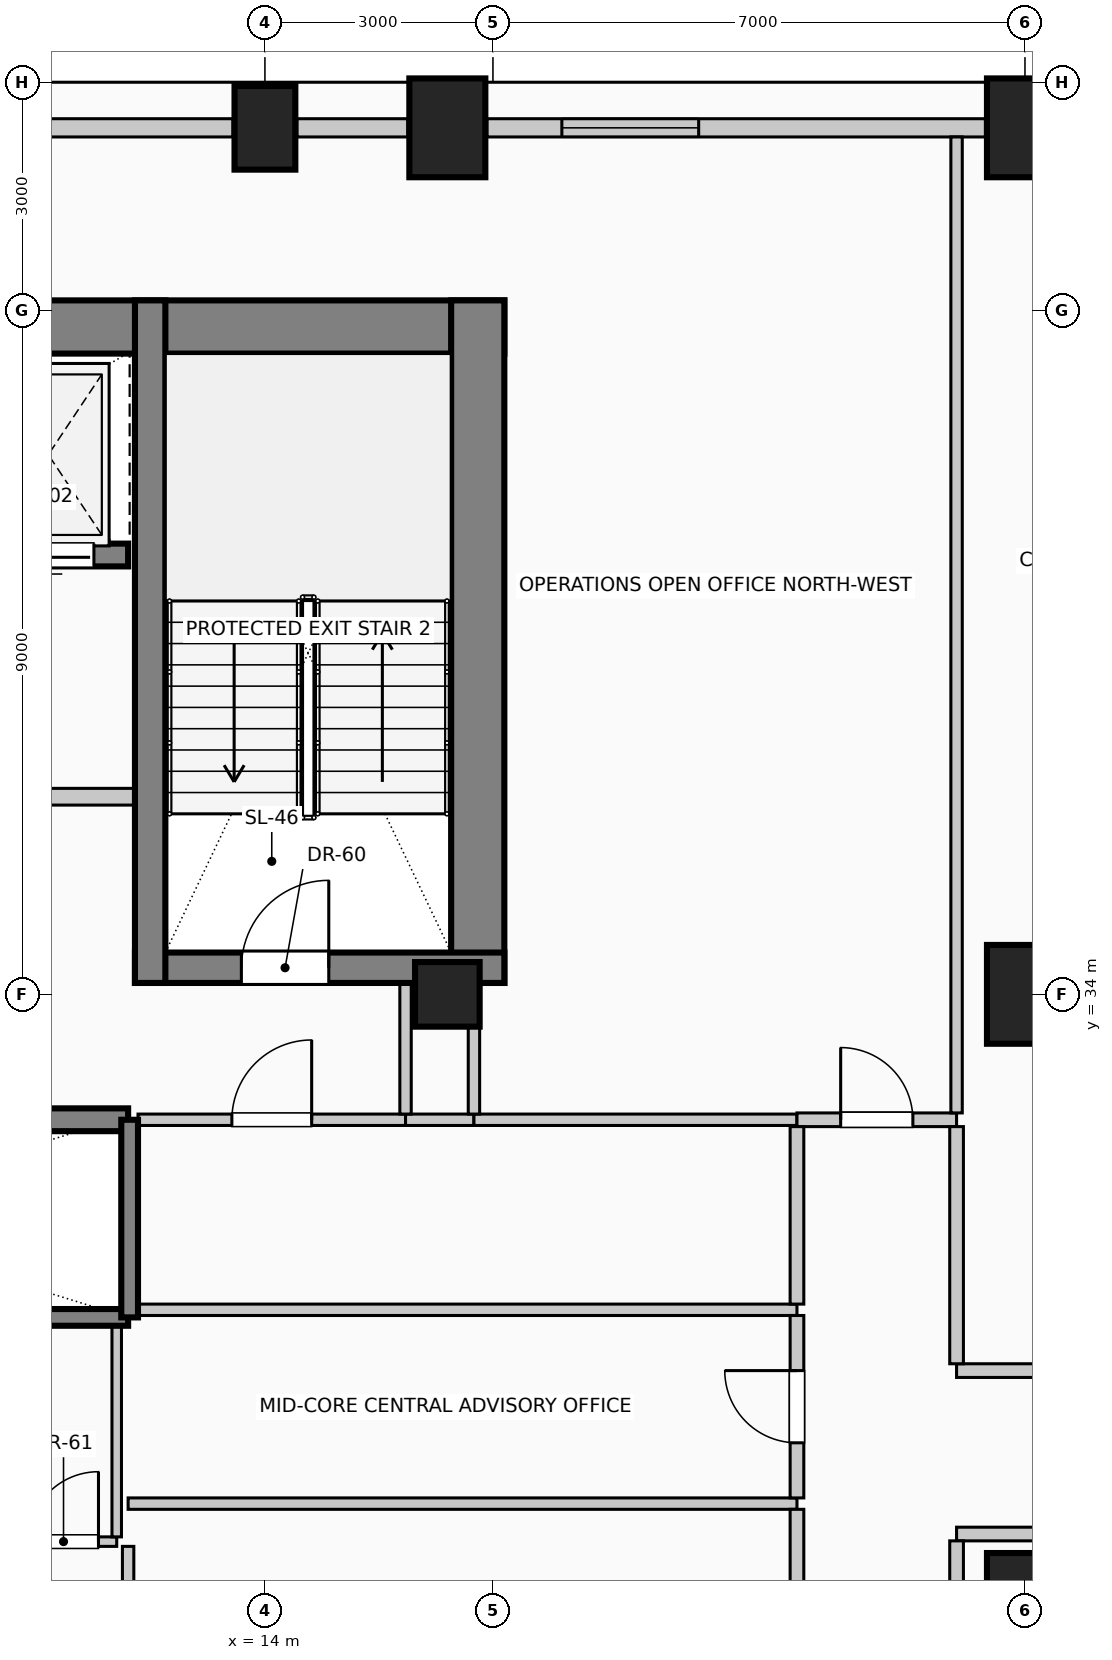
"""IFC4 building model, lengths in metres.
Left out: names, types, materials, properties, quantities, classifications, styles, units other than length and angle.
Written with IfcOpenShell. Run it as: python <this file> out.ifc"""

import sys

from ifc_helpers import new_model, si_unit, direction, frame, frame_2d, origin, origin_2d, place, context, subcontext, project, spatial, rectangle, circle, extrude, element, fill, save


model = new_model("IFC4")
c1 = context("Model", 3, precision=1e-05, world=origin(), true_north=direction((0.0, 1.0)))
c2 = subcontext(c1, "Body", "Model", "MODEL_VIEW")
j1 = project(units=[si_unit("LENGTHUNIT", "METRE"), si_unit("PLANEANGLEUNIT", "RADIAN")], contexts=[c1])
p1 = place(None, origin())
s1 = spatial("IfcSite", under=j1, at=p1, CompositionType="ELEMENT")
p2 = place(p1, origin())
s2 = spatial("IfcBuilding", under=s1, at=p2, CompositionType="ELEMENT")
p3 = place(p2, frame((0.0, 0.0, 214.6)))
s3 = spatial("IfcBuildingStorey", under=s2, at=p3, CompositionType="ELEMENT", Elevation=214.6)
p4 = place(p3, frame((2.85, 42.78, 0.0), z_axis=(0.0, 0.0, 1.0), x_axis=(1.0, 0.0, 0.0)))
e1 = element("IfcWall", 1, at=p4, inside=s3, PredefinedType="SHEAR", context=c2, shape_type="SweptSolid", body=[
    extrude(rectangle(XDim=14.3, YDim=0.7, at=frame_2d((7.15, 0.0))), origin(), (0.0, 0.0, 1.0), 4.0),
])
p5 = place(p3, frame((16.8, 34.15, 0.0), z_axis=(0.0, 0.0, 1.0), x_axis=(0.0, 1.0, 0.0)))
e2 = element("IfcWall", 2, at=p5, inside=s3, PredefinedType="SHEAR", context=c2, shape_type="SweptSolid", body=[
    extrude(rectangle(XDim=8.98, YDim=0.7, at=frame_2d((4.49, 0.0))), origin(), (0.0, 0.0, 1.0), 4.0),
])
p6 = place(p3, frame((12.29, 34.35, 0.0), z_axis=(0.0, 0.0, 1.0), x_axis=(1.0, 0.0, 0.0)))
e3 = element("IfcWall", 3, at=p6, inside=s3, PredefinedType="SHEAR", context=c2, shape_type="SweptSolid", body=[
    extrude(rectangle(XDim=4.86, YDim=0.4, at=frame_2d((2.43, 0.0))), origin(), (0.0, 0.0, 1.0), 4.0),
])
p7 = place(p6, frame((1.4, 0.0, 0.0)))
e4 = element("IfcOpeningElement", 4, at=p7, cuts=e3, PredefinedType="OPENING", context=c2, shape_type="SweptSolid", body=[
    extrude(rectangle(XDim=1.15, YDim=2.2, at=frame_2d((0.575, 1.1))), frame((0.0, 0.21, 0.0), z_axis=(0.0, -1.0, 0.0), x_axis=(1.0, 0.0, 0.0)), (0.0, 0.0, 1.0), 0.42),
])
p8 = place(p3, frame((12.49, 34.15, 0.0), z_axis=(0.0, 0.0, 1.0), x_axis=(0.0, 1.0, 0.0)))
e5 = element("IfcWall", 5, at=p8, inside=s3, PredefinedType="SHEAR", context=c2, shape_type="SweptSolid", body=[
    extrude(rectangle(XDim=8.98, YDim=0.4, at=frame_2d((4.49, 0.0))), origin(), (0.0, 0.0, 1.0), 4.0),
])
p9 = place(p3, frame((14.0, 45.4, 0.0), z_axis=(0.0, 0.0, 1.0), x_axis=(1.0, 0.0, 0.0)))
e6 = element("IfcColumn", 6, at=p9, inside=s3, PredefinedType="COLUMN", context=c2, shape_type="SweptSolid", body=[
    extrude(rectangle(XDim=0.8, YDim=1.1, at=origin_2d()), origin(), (0.0, 0.0, 1.0), 4.0),
])
for number, where, z_axis, x_axis in (
    (7, (16.4, 45.4, 0.0), (0.0, 0.0, 1.0), (1.0, 0.0, 0.0)),
    (8, (24.0, 45.4, 0.0), (0.0, 0.0, 1.0), (1.0, 0.0, 0.0)),
    (9, (24.0, 26.0, 0.0), (0.0, 0.0, 1.0), (1.0, 0.0, 0.0)),
    (10, (24.0, 34.0, 0.0), (0.0, 0.0, 1.0), (1.0, 0.0, 0.0)),
):
    element("IfcColumn", number, at=place(p3, frame(where, z_axis=z_axis, x_axis=x_axis)), inside=s3, PredefinedType="COLUMN", context=c2, shape_type="SweptSolid", body=[
        extrude(rectangle(XDim=1.0, YDim=1.3, at=origin_2d()), origin(), (0.0, 0.0, 1.0), 4.0),
    ])
p10 = place(p3, frame((16.4, 34.0, 0.0), z_axis=(0.0, 0.0, 1.0), x_axis=(1.0, 0.0, 0.0)))
e11 = element("IfcColumn", 11, at=p10, inside=s3, PredefinedType="COLUMN", context=c2, shape_type="SweptSolid", body=[
    extrude(circle(Radius=0.425, at=origin_2d()), origin(), (0.0, 0.0, 1.0), 4.0),
])
p11 = place(p3, frame((8.92, 45.4, 0.0), z_axis=(0.0, 0.0, 1.0), x_axis=(1.0, 0.0, 0.0)))
e12 = element("IfcWall", 12, at=p11, inside=s3, PredefinedType="SOLIDWALL", context=c2, shape_type="SweptSolid", body=[
    extrude(rectangle(XDim=4.66, YDim=0.24, at=frame_2d((2.33, 0.0))), origin(), (0.0, 0.0, 1.0), 3.0),
])
p12 = place(p3, frame((14.42, 45.4, 0.0), z_axis=(0.0, 0.0, 1.0), x_axis=(1.0, 0.0, 0.0)))
e13 = element("IfcWall", 13, at=p12, inside=s3, PredefinedType="SOLIDWALL", context=c2, shape_type="SweptSolid", body=[
    extrude(rectangle(XDim=1.46, YDim=0.24, at=frame_2d((0.73, 0.0))), origin(), (0.0, 0.0, 1.0), 3.0),
])
p13 = place(p3, frame((16.92, 45.4, 0.0), z_axis=(0.0, 0.0, 1.0), x_axis=(1.0, 0.0, 0.0)))
e14 = element("IfcWall", 14, at=p13, inside=s3, PredefinedType="SOLIDWALL", context=c2, shape_type="SweptSolid", body=[
    extrude(rectangle(XDim=6.56, YDim=0.24, at=frame_2d((3.28, 0.0))), origin(), (0.0, 0.0, 1.0), 3.0),
])
p14 = place(p13, frame((0.987, 0.0, 0.42)))
e15 = element("IfcOpeningElement", 15, at=p14, cuts=e14, PredefinedType="OPENING", context=c2, shape_type="SweptSolid", body=[
    extrude(rectangle(XDim=1.8, YDim=2.2, at=frame_2d((0.9, 1.1))), frame((0.0, 0.13, 0.0), z_axis=(0.0, -1.0, 0.0), x_axis=(1.0, 0.0, 0.0)), (0.0, 0.0, 1.0), 0.26),
])
p15 = place(p3, frame((10.05, 32.35, 0.0), z_axis=(0.0, 0.0, 1.0), x_axis=(1.0, 0.0, 0.0)))
e16 = element("IfcWall", 16, at=p15, inside=s3, PredefinedType="SOLIDWALL", context=c2, shape_type="SweptSolid", body=[
    extrude(rectangle(XDim=2.15, YDim=0.3, at=frame_2d((1.075, 0.0))), origin(), (0.0, 0.0, 1.0), 4.0),
])
p16 = place(p3, frame((12.2, 39.78, 0.0), z_axis=(0.0, 0.0, 1.0), x_axis=(-1.0, 0.0, 0.0)))
e17 = element("IfcWall", 17, at=p16, inside=s3, PredefinedType="SOLIDWALL", context=c2, shape_type="SweptSolid", body=[
    extrude(rectangle(XDim=2.2, YDim=0.3, at=frame_2d((1.1, 0.0))), origin(), (0.0, 0.0, 1.0), 4.0),
])
p17 = place(p16, frame((0.45, 0.0, 0.0)))
e18 = element("IfcOpeningElement", 18, at=p17, cuts=e17, PredefinedType="OPENING", context=c2, shape_type="SweptSolid", body=[
    extrude(rectangle(XDim=1.3, YDim=2.25, at=frame_2d((0.65, 1.125))), frame((0.0, 0.16, 0.0), z_axis=(0.0, -1.0, 0.0), x_axis=(1.0, 0.0, 0.0)), (0.0, 0.0, 1.0), 0.32),
])
p18 = place(p3, frame((3.55, 29.75, 0.0), z_axis=(0.0, 0.0, 1.0), x_axis=(1.0, 0.0, 0.0)))
e19 = element("IfcWall", 19, at=p18, inside=s3, PredefinedType="SOLIDWALL", context=c2, shape_type="SweptSolid", body=[
    extrude(rectangle(XDim=8.65, YDim=0.22, at=frame_2d((4.325, 0.0))), origin(), (0.0, 0.0, 1.0), 4.0),
])
p19 = place(p3, frame((12.22, 29.75, 0.0), z_axis=(0.0, 0.0, 1.0), x_axis=(0.0, 1.0, 0.0)))
e20 = element("IfcWall", 20, at=p19, inside=s3, PredefinedType="SOLIDWALL", context=c2, shape_type="SweptSolid", body=[
    extrude(rectangle(XDim=2.6, YDim=0.22, at=frame_2d((1.3, 0.0))), origin(), (0.0, 0.0, 1.0), 4.0),
])
p20 = place(p3, frame((7.51, 36.6, 0.0), z_axis=(0.0, 0.0, 1.0), x_axis=(1.0, 0.0, 0.0)))
e21 = element("IfcWall", 21, at=p20, inside=s3, PredefinedType="PARTITIONING", context=c2, shape_type="SweptSolid", body=[
    extrude(rectangle(XDim=4.98, YDim=0.22, at=frame_2d((2.49, 0.0))), origin(), (0.0, 0.0, 1.0), 3.75),
])
p21 = place(p20, frame((1.94, 0.0, 0.0)))
e22 = element("IfcOpeningElement", 22, at=p21, cuts=e21, PredefinedType="OPENING", context=c2, shape_type="SweptSolid", body=[
    extrude(rectangle(XDim=1.1, YDim=2.2, at=frame_2d((0.55, 1.1))), frame((0.0, 0.12, 0.0), z_axis=(0.0, -1.0, 0.0), x_axis=(1.0, 0.0, 0.0)), (0.0, 0.0, 1.0), 0.24),
])
p22 = place(p3, frame((10.65, 26.8, 0.0), z_axis=(0.0, 0.0, 1.0), x_axis=(1.0, 0.0, 0.0)))
e23 = element("IfcWall", 23, at=p22, inside=s3, PredefinedType="PARTITIONING", context=c2, shape_type="SweptSolid", body=[
    extrude(rectangle(XDim=1.4, YDim=0.125, at=frame_2d((0.7, 0.0))), origin(), (0.0, 0.0, 1.0), 3.75),
])
p23 = place(p22, frame((0.24, 0.0, 0.0)))
e24 = element("IfcOpeningElement", 24, at=p23, cuts=e23, PredefinedType="OPENING", context=c2, shape_type="SweptSolid", body=[
    extrude(rectangle(XDim=0.92, YDim=2.1, at=frame_2d((0.46, 1.05))), frame((0.0, 0.073, 0.0), z_axis=(0.0, -1.0, 0.0), x_axis=(1.0, 0.0, 0.0)), (0.0, 0.0, 1.0), 0.145),
])
p24 = place(p3, frame((23.1, 26.9, 0.0), z_axis=(0.0, 0.0, 1.0), x_axis=(1.0, 0.0, 0.0)))
e25 = element("IfcWall", 25, at=p24, inside=s3, PredefinedType="PARTITIONING", context=c2, shape_type="SweptSolid", body=[
    extrude(rectangle(XDim=11.65, YDim=0.18, at=frame_2d((5.825, 0.0))), origin(), (0.0, 0.0, 1.0), 3.75),
])
p25 = place(p24, frame((5.3, 0.0, 0.0)))
e26 = element("IfcOpeningElement", 26, at=p25, cuts=e25, PredefinedType="OPENING", context=c2, shape_type="SweptSolid", body=[
    extrude(rectangle(XDim=1.05, YDim=2.15, at=frame_2d((0.525, 1.075))), frame((0.0, 0.1, 0.0), z_axis=(0.0, -1.0, 0.0), x_axis=(1.0, 0.0, 0.0)), (0.0, 0.0, 1.0), 0.2),
])
p26 = place(p3, frame((12.2, 27.3, 0.0), z_axis=(0.0, 0.0, 1.0), x_axis=(1.0, 0.0, 0.0)))
e27 = element("IfcWall", 27, at=p26, inside=s3, PredefinedType="PARTITIONING", context=c2, shape_type="SweptSolid", body=[
    extrude(rectangle(XDim=8.8, YDim=0.15, at=frame_2d((4.4, 0.0))), origin(), (0.0, 0.0, 1.0), 3.75),
])
p27 = place(p3, frame((23.1, 29.05, 0.0), z_axis=(0.0, 0.0, 1.0), x_axis=(1.0, 0.0, 0.0)))
e28 = element("IfcWall", 28, at=p27, inside=s3, PredefinedType="PARTITIONING", context=c2, shape_type="SweptSolid", body=[
    extrude(rectangle(XDim=4.99, YDim=0.18, at=frame_2d((2.495, 0.0))), origin(), (0.0, 0.0, 1.0), 3.75),
])
p28 = place(p27, frame((2.02, 0.0, 0.0)))
e29 = element("IfcOpeningElement", 29, at=p28, cuts=e28, PredefinedType="OPENING", context=c2, shape_type="SweptSolid", body=[
    extrude(rectangle(XDim=0.95, YDim=2.15, at=frame_2d((0.475, 1.075))), frame((0.0, 0.1, 0.0), z_axis=(0.0, -1.0, 0.0), x_axis=(1.0, 0.0, 0.0)), (0.0, 0.0, 1.0), 0.2),
])
p29 = place(p3, frame((12.33, 29.85, 0.0), z_axis=(0.0, 0.0, 1.0), x_axis=(1.0, 0.0, 0.0)))
e30 = element("IfcWall", 30, at=p29, inside=s3, PredefinedType="PARTITIONING", context=c2, shape_type="SweptSolid", body=[
    extrude(rectangle(XDim=8.67, YDim=0.15, at=frame_2d((4.335, 0.0))), origin(), (0.0, 0.0, 1.0), 3.75),
])
p30 = place(p3, frame((12.33, 32.35, 0.0), z_axis=(0.0, 0.0, 1.0), x_axis=(1.0, 0.0, 0.0)))
e31 = element("IfcWall", 31, at=p30, inside=s3, PredefinedType="PARTITIONING", context=c2, shape_type="SweptSolid", body=[
    extrude(rectangle(XDim=3.52, YDim=0.15, at=frame_2d((1.76, 0.0))), origin(), (0.0, 0.0, 1.0), 3.75),
])
p31 = place(p30, frame((1.235, 0.0, 0.0)))
e32 = element("IfcOpeningElement", 32, at=p31, cuts=e31, PredefinedType="OPENING", context=c2, shape_type="SweptSolid", body=[
    extrude(rectangle(XDim=1.05, YDim=2.15, at=frame_2d((0.525, 1.075))), frame((0.0, 0.085, 0.0), z_axis=(0.0, -1.0, 0.0), x_axis=(1.0, 0.0, 0.0)), (0.0, 0.0, 1.0), 0.17),
])
p32 = place(p3, frame((15.85, 32.35, 0.0), z_axis=(0.0, 0.0, 1.0), x_axis=(1.0, 0.0, 0.0)))
e33 = element("IfcWall", 33, at=p32, inside=s3, PredefinedType="PARTITIONING", context=c2, shape_type="SweptSolid", body=[
    extrude(rectangle(XDim=0.9, YDim=0.15, at=frame_2d((0.45, 0.0))), origin(), (0.0, 0.0, 1.0), 3.75),
])
p33 = place(p3, frame((16.75, 32.35, 0.0), z_axis=(0.0, 0.0, 1.0), x_axis=(1.0, 0.0, 0.0)))
e34 = element("IfcWall", 34, at=p33, inside=s3, PredefinedType="PARTITIONING", context=c2, shape_type="SweptSolid", body=[
    extrude(rectangle(XDim=4.25, YDim=0.15, at=frame_2d((2.125, 0.0))), origin(), (0.0, 0.0, 1.0), 3.75),
])
p34 = place(p3, frame((21.0, 32.35, 0.0), z_axis=(0.0, 0.0, 1.0), x_axis=(1.0, 0.0, 0.0)))
e35 = element("IfcWall", 35, at=p34, inside=s3, PredefinedType="PARTITIONING", context=c2, shape_type="SweptSolid", body=[
    extrude(rectangle(XDim=2.1, YDim=0.18, at=frame_2d((1.05, 0.0))), origin(), (0.0, 0.0, 1.0), 3.75),
])
p35 = place(p34, frame((0.575, 0.0, 0.0)))
e36 = element("IfcOpeningElement", 36, at=p35, cuts=e35, PredefinedType="OPENING", context=c2, shape_type="SweptSolid", body=[
    extrude(rectangle(XDim=0.95, YDim=2.15, at=frame_2d((0.475, 1.075))), frame((0.0, 0.1, 0.0), z_axis=(0.0, -1.0, 0.0), x_axis=(1.0, 0.0, 0.0)), (0.0, 0.0, 1.0), 0.2),
])
p36 = place(p3, frame((12.05, 26.863, 0.0), z_axis=(0.0, 0.0, 1.0), x_axis=(0.0, 1.0, 0.0)))
e37 = element("IfcWall", 37, at=p36, inside=s3, PredefinedType="PARTITIONING", context=c2, shape_type="SweptSolid", body=[
    extrude(rectangle(XDim=2.777, YDim=0.125, at=frame_2d((1.389, 0.0))), origin(), (0.0, 0.0, 1.0), 3.75),
])
p37 = place(p3, frame((12.2, 24.863, 0.0), z_axis=(0.0, 0.0, 1.0), x_axis=(0.0, 1.0, 0.0)))
e38 = element("IfcWall", 38, at=p37, inside=s3, PredefinedType="PARTITIONING", context=c2, shape_type="SweptSolid", body=[
    extrude(rectangle(XDim=1.875, YDim=0.15, at=frame_2d((0.938, 0.0))), origin(), (0.0, 0.0, 1.0), 3.75),
])
p38 = place(p37, frame((0.462, 0.0, 0.0)))
e39 = element("IfcOpeningElement", 39, at=p38, cuts=e38, PredefinedType="OPENING", context=c2, shape_type="SweptSolid", body=[
    extrude(rectangle(XDim=0.95, YDim=2.15, at=frame_2d((0.475, 1.075))), frame((0.0, 0.085, 0.0), z_axis=(0.0, -1.0, 0.0), x_axis=(1.0, 0.0, 0.0)), (0.0, 0.0, 1.0), 0.17),
])
p39 = place(p3, frame((15.85, 32.425, 0.0), z_axis=(0.0, 0.0, 1.0), x_axis=(0.0, 1.0, 0.0)))
e40 = element("IfcWall", 40, at=p39, inside=s3, PredefinedType="PARTITIONING", context=c2, shape_type="SweptSolid", body=[
    extrude(rectangle(XDim=1.725, YDim=0.15, at=frame_2d((0.862, 0.0))), origin(), (0.0, 0.0, 1.0), 3.75),
])
p40 = place(p3, frame((16.75, 32.425, 0.0), z_axis=(0.0, 0.0, 1.0), x_axis=(0.0, 1.0, 0.0)))
e41 = element("IfcWall", 41, at=p40, inside=s3, PredefinedType="PARTITIONING", context=c2, shape_type="SweptSolid", body=[
    extrude(rectangle(XDim=1.15, YDim=0.15, at=frame_2d((0.575, 0.0))), origin(), (0.0, 0.0, 1.0), 3.75),
])
p41 = place(p3, frame((21.0, 24.875, 0.0), z_axis=(0.0, 0.0, 1.0), x_axis=(0.0, 1.0, 0.0)))
e42 = element("IfcWall", 42, at=p41, inside=s3, PredefinedType="PARTITIONING", context=c2, shape_type="SweptSolid", body=[
    extrude(rectangle(XDim=2.35, YDim=0.18, at=frame_2d((1.175, 0.0))), origin(), (0.0, 0.0, 1.0), 3.75),
])
p42 = place(p3, frame((21.0, 27.375, 0.0), z_axis=(0.0, 0.0, 1.0), x_axis=(0.0, 1.0, 0.0)))
e43 = element("IfcWall", 43, at=p42, inside=s3, PredefinedType="PARTITIONING", context=c2, shape_type="SweptSolid", body=[
    extrude(rectangle(XDim=2.4, YDim=0.18, at=frame_2d((1.2, 0.0))), origin(), (0.0, 0.0, 1.0), 3.75),
])
p43 = place(p42, frame((0.725, 0.0, 0.0)))
e44 = element("IfcOpeningElement", 44, at=p43, cuts=e43, PredefinedType="OPENING", context=c2, shape_type="SweptSolid", body=[
    extrude(rectangle(XDim=0.95, YDim=2.15, at=frame_2d((0.475, 1.075))), frame((0.0, 0.1, 0.0), z_axis=(0.0, -1.0, 0.0), x_axis=(1.0, 0.0, 0.0)), (0.0, 0.0, 1.0), 0.2),
])
p44 = place(p3, frame((21.0, 29.925, 0.0), z_axis=(0.0, 0.0, 1.0), x_axis=(0.0, 1.0, 0.0)))
e45 = element("IfcWall", 45, at=p44, inside=s3, PredefinedType="PARTITIONING", context=c2, shape_type="SweptSolid", body=[
    extrude(rectangle(XDim=2.335, YDim=0.18, at=frame_2d((1.167, 0.0))), origin(), (0.0, 0.0, 1.0), 3.75),
])
p45 = place(p3, frame((23.1, 19.725, 0.0), z_axis=(0.0, 0.0, 1.0), x_axis=(0.0, 1.0, 0.0)))
e46 = element("IfcWall", 46, at=p45, inside=s3, PredefinedType="PARTITIONING", context=c2, shape_type="SweptSolid", body=[
    extrude(rectangle(XDim=7.085, YDim=0.18, at=frame_2d((3.542, 0.0))), origin(), (0.0, 0.0, 1.0), 3.75),
])
p46 = place(p3, frame((23.1, 29.14, 0.0), z_axis=(0.0, 0.0, 1.0), x_axis=(0.0, 1.0, 0.0)))
e47 = element("IfcWall", 47, at=p46, inside=s3, PredefinedType="PARTITIONING", context=c2, shape_type="SweptSolid", body=[
    extrude(rectangle(XDim=3.12, YDim=0.18, at=frame_2d((1.56, 0.0))), origin(), (0.0, 0.0, 1.0), 3.75),
])
p47 = place(p3, frame((23.1, 32.44, 0.0), z_axis=(0.0, 0.0, 1.0), x_axis=(0.0, 1.0, 0.0)))
e48 = element("IfcWall", 48, at=p47, inside=s3, PredefinedType="PARTITIONING", context=c2, shape_type="SweptSolid", body=[
    extrude(rectangle(XDim=12.84, YDim=0.15, at=frame_2d((6.42, 0.0))), origin(), (0.0, 0.0, 1.0), 3.75),
])
p48 = place(p14, origin())
e49 = element("IfcWindow", 49, at=p48, inside=s3, PartitioningType="SINGLE_PANEL", PredefinedType="WINDOW", context=c2, shape_type="SweptSolid", body=[
    extrude(rectangle(XDim=1.8, YDim=2.2, at=frame_2d((0.9, 1.1))), frame((0.0, 0.03, 0.0), z_axis=(0.0, -1.0, 0.0), x_axis=(1.0, 0.0, 0.0)), (0.0, 0.0, 1.0), 0.06),
])
fill(e15, e49)
p49 = place(p17, origin())
e50 = element("IfcDoor", 50, at=p49, inside=s3, OperationType="SLIDING_TO_RIGHT", PredefinedType="DOOR", context=c2, shape_type="SweptSolid", body=[
    extrude(rectangle(XDim=1.3, YDim=2.25, at=frame_2d((0.65, 1.125))), frame((0.0, 0.025, 0.0), z_axis=(0.0, -1.0, 0.0), x_axis=(1.0, 0.0, 0.0)), (0.0, 0.0, 1.0), 0.05),
])
fill(e18, e50)
p50 = place(p7, origin())
e51 = element("IfcDoor", 51, at=p50, inside=s3, OperationType="SINGLE_SWING_RIGHT", PredefinedType="DOOR", context=c2, shape_type="SweptSolid", body=[
    extrude(rectangle(XDim=1.15, YDim=2.2, at=frame_2d((0.575, 1.1))), frame((0.0, 0.025, 0.0), z_axis=(0.0, -1.0, 0.0), x_axis=(1.0, 0.0, 0.0)), (0.0, 0.0, 1.0), 0.05),
])
fill(e4, e51)
p51 = place(p23, origin())
e52 = element("IfcDoor", 52, at=p51, inside=s3, OperationType="SINGLE_SWING_RIGHT", PredefinedType="DOOR", context=c2, shape_type="SweptSolid", body=[
    extrude(rectangle(XDim=0.92, YDim=2.1, at=frame_2d((0.46, 1.05))), frame((0.0, 0.025, 0.0), z_axis=(0.0, -1.0, 0.0), x_axis=(1.0, 0.0, 0.0)), (0.0, 0.0, 1.0), 0.05),
])
fill(e24, e52)
p52 = place(p31, origin())
e53 = element("IfcDoor", 53, at=p52, inside=s3, OperationType="SINGLE_SWING_RIGHT", PredefinedType="DOOR", context=c2, shape_type="SweptSolid", body=[
    extrude(rectangle(XDim=1.05, YDim=2.15, at=frame_2d((0.525, 1.075))), frame((0.0, 0.025, 0.0), z_axis=(0.0, -1.0, 0.0), x_axis=(1.0, 0.0, 0.0)), (0.0, 0.0, 1.0), 0.05),
])
fill(e32, e53)
p53 = place(p35, origin())
e54 = element("IfcDoor", 54, at=p53, inside=s3, OperationType="SINGLE_SWING_LEFT", PredefinedType="DOOR", context=c2, shape_type="SweptSolid", body=[
    extrude(rectangle(XDim=0.95, YDim=2.15, at=frame_2d((0.475, 1.075))), frame((0.0, 0.025, 0.0), z_axis=(0.0, -1.0, 0.0), x_axis=(1.0, 0.0, 0.0)), (0.0, 0.0, 1.0), 0.05),
])
fill(e36, e54)
p54 = place(p43, origin())
e55 = element("IfcDoor", 55, at=p54, inside=s3, OperationType="SINGLE_SWING_RIGHT", PredefinedType="DOOR", context=c2, shape_type="SweptSolid", body=[
    extrude(rectangle(XDim=0.95, YDim=2.15, at=frame_2d((0.475, 1.075))), frame((0.0, 0.025, 0.0), z_axis=(0.0, -1.0, 0.0), x_axis=(1.0, 0.0, 0.0)), (0.0, 0.0, 1.0), 0.05),
])
fill(e44, e55)
save(model, sys.argv[1])
